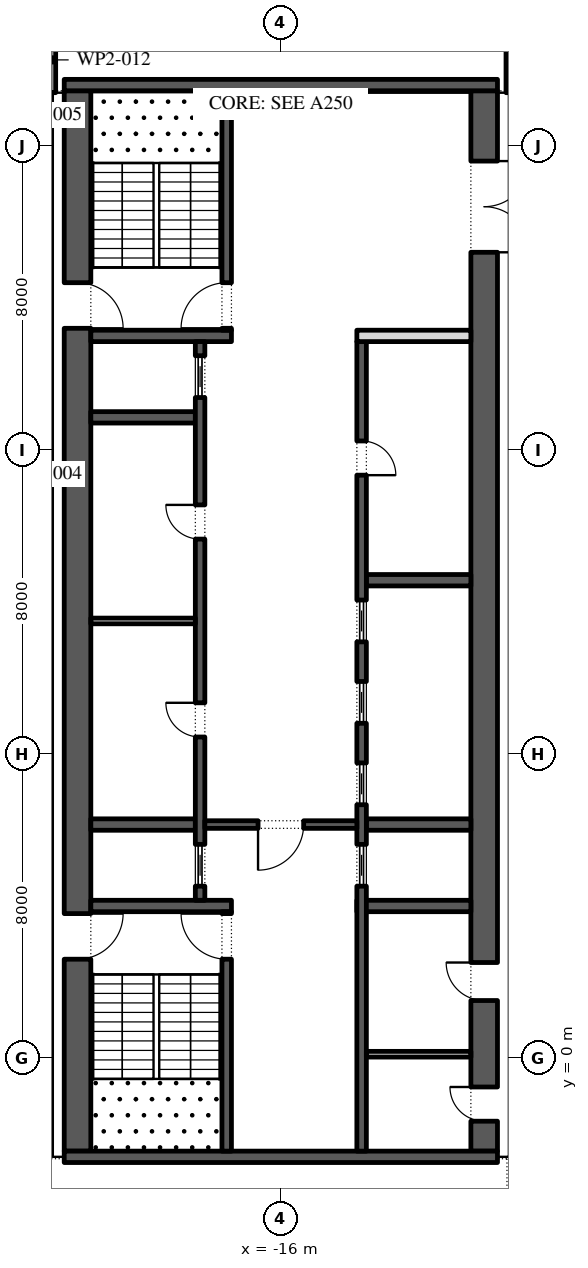
"""IFC4 building model, lengths in metres.
Left out: names, types, materials, properties, quantities, classifications, styles, units other than length and angle.
Written with IfcOpenShell. Run it as: python <this file> out.ifc"""

import sys

from ifc_helpers import new_model, si_unit, direction, frame, frame_2d, origin, place, context, subcontext, project, spatial, rectangle, extrude, element, fill, save


model = new_model("IFC4")
c1 = context("Model", 3, precision=1e-05, world=origin(), true_north=direction((0.0, 1.0)))
c2 = subcontext(c1, "Body", "Model", "MODEL_VIEW")
j1 = project(units=[si_unit("LENGTHUNIT", "METRE"), si_unit("PLANEANGLEUNIT", "RADIAN")], contexts=[c1])
p1 = place(None, origin())
s1 = spatial("IfcSite", under=j1, at=p1, CompositionType="ELEMENT")
p2 = place(p1, origin())
s2 = spatial("IfcBuilding", under=s1, at=p2, CompositionType="ELEMENT")
p3 = place(p2, frame((0.0, 0.0, 213.6)))
s3 = spatial("IfcBuildingStorey", under=s2, at=p3, CompositionType="ELEMENT", Elevation=213.6)
p4 = place(p3, frame((-33.157, 30.092, 0.0), z_axis=(0.0, 0.0, 1.0), x_axis=(0.224950279389, -0.974370243697, 0.0)))
e1 = element("IfcWall", 1, at=p4, inside=s3, PredefinedType="STANDARD", context=c2, shape_type="SweptSolid", body=[
    extrude(rectangle(XDim=49.5, YDim=0.3, at=frame_2d((24.75, 0.0))), origin(), (0.0, 0.0, 1.0), 4.0),
])
p5 = place(p4, frame((2.207, 0.0, 0.0)))
e2 = element("IfcOpeningElement", 2, at=p5, cuts=e1, PredefinedType="OPENING", context=c2, shape_type="SweptSolid", body=[
    extrude(rectangle(XDim=2.4, YDim=3.5, at=frame_2d((1.2, 1.75))), frame((0.0, 0.16, 0.0), z_axis=(0.0, -1.0, 0.0), x_axis=(1.0, 0.0, 0.0)), (0.0, 0.0, 1.0), 0.32),
])
p6 = place(p4, frame((8.121, 0.0, 0.45)))
e3 = element("IfcOpeningElement", 3, at=p6, cuts=e1, PredefinedType="OPENING", context=c2, shape_type="SweptSolid", body=[
    extrude(rectangle(XDim=4.5, YDim=2.825, at=frame_2d((2.25, 1.413))), frame((0.0, 0.16, 0.0), z_axis=(0.0, -1.0, 0.0), x_axis=(1.0, 0.0, 0.0)), (0.0, 0.0, 1.0), 0.32),
])
p7 = place(p4, frame((15.236, 0.0, 0.45)))
e4 = element("IfcOpeningElement", 4, at=p7, cuts=e1, PredefinedType="OPENING", context=c2, shape_type="SweptSolid", body=[
    extrude(rectangle(XDim=4.5, YDim=2.95, at=frame_2d((2.25, 1.475))), frame((0.0, 0.16, 0.0), z_axis=(0.0, -1.0, 0.0), x_axis=(1.0, 0.0, 0.0)), (0.0, 0.0, 1.0), 0.32),
])
p8 = place(p4, frame((22.35, 0.0, 0.45)))
e5 = element("IfcOpeningElement", 5, at=p8, cuts=e1, PredefinedType="OPENING", context=c2, shape_type="SweptSolid", body=[
    extrude(rectangle(XDim=4.5, YDim=3.0, at=frame_2d((2.25, 1.5))), frame((0.0, 0.16, 0.0), z_axis=(0.0, -1.0, 0.0), x_axis=(1.0, 0.0, 0.0)), (0.0, 0.0, 1.0), 0.32),
])
p9 = place(p4, frame((30.514, 0.0, 0.0)))
e6 = element("IfcOpeningElement", 6, at=p9, cuts=e1, PredefinedType="OPENING", context=c2, shape_type="SweptSolid", body=[
    extrude(rectangle(XDim=2.4, YDim=3.5, at=frame_2d((1.2, 1.75))), frame((0.0, 0.16, 0.0), z_axis=(0.0, -1.0, 0.0), x_axis=(1.0, 0.0, 0.0)), (0.0, 0.0, 1.0), 0.32),
])
p10 = place(p4, frame((36.579, 0.0, 0.45)))
e7 = element("IfcOpeningElement", 7, at=p10, cuts=e1, PredefinedType="OPENING", context=c2, shape_type="SweptSolid", body=[
    extrude(rectangle(XDim=4.5, YDim=3.05, at=frame_2d((2.25, 1.525))), frame((0.0, 0.16, 0.0), z_axis=(0.0, -1.0, 0.0), x_axis=(1.0, 0.0, 0.0)), (0.0, 0.0, 1.0), 0.32),
])
p11 = place(p4, frame((43.693, 0.0, 0.45)))
e8 = element("IfcOpeningElement", 8, at=p11, cuts=e1, PredefinedType="OPENING", context=c2, shape_type="SweptSolid", body=[
    extrude(rectangle(XDim=4.5, YDim=3.05, at=frame_2d((2.25, 1.525))), frame((0.0, 0.16, 0.0), z_axis=(0.0, -1.0, 0.0), x_axis=(1.0, 0.0, 0.0)), (0.0, 0.0, 1.0), 0.32),
])
p12 = place(p3, frame((-21.35, -2.45, 0.0), z_axis=(0.0, 0.0, 1.0), x_axis=(0.0, 1.0, 0.0)))
e9 = element("IfcWall", 9, at=p12, inside=s3, PredefinedType="SHEAR", context=c2, shape_type="SweptSolid", body=[
    extrude(rectangle(XDim=27.9, YDim=0.7, at=frame_2d((13.95, 0.0))), origin(), (0.0, 0.0, 1.0), 4.0),
])
p13 = place(p12, frame((5.05, 0.0, 0.0)))
e10 = element("IfcOpeningElement", 10, at=p13, cuts=e9, PredefinedType="OPENING", context=c2, shape_type="SweptSolid", body=[
    extrude(rectangle(XDim=1.2, YDim=2.1, at=frame_2d((0.6, 1.05))), frame((0.0, 0.36, 0.0), z_axis=(0.0, -1.0, 0.0), x_axis=(1.0, 0.0, 0.0)), (0.0, 0.0, 1.0), 0.72),
])
p14 = place(p12, frame((21.65, 0.0, 0.0)))
e11 = element("IfcOpeningElement", 11, at=p14, cuts=e9, PredefinedType="OPENING", context=c2, shape_type="SweptSolid", body=[
    extrude(rectangle(XDim=1.2, YDim=2.1, at=frame_2d((0.6, 1.05))), frame((0.0, 0.36, 0.0), z_axis=(0.0, -1.0, 0.0), x_axis=(1.0, 0.0, 0.0)), (0.0, 0.0, 1.0), 0.72),
])
p15 = place(p3, frame((-10.65, -2.45, 0.0), z_axis=(0.0, 0.0, 1.0), x_axis=(0.0, 1.0, 0.0)))
e12 = element("IfcWall", 12, at=p15, inside=s3, PredefinedType="SHEAR", context=c2, shape_type="SweptSolid", body=[
    extrude(rectangle(XDim=27.9, YDim=0.7, at=frame_2d((13.95, 0.0))), origin(), (0.0, 0.0, 1.0), 4.0),
])
p16 = place(p15, frame((23.65, 0.0, 0.0)))
e13 = element("IfcOpeningElement", 13, at=p16, cuts=e12, PredefinedType="OPENING", context=c2, shape_type="SweptSolid", body=[
    extrude(rectangle(XDim=2.4, YDim=2.1, at=frame_2d((1.2, 1.05))), frame((0.0, 0.36, 0.0), z_axis=(0.0, -1.0, 0.0), x_axis=(1.0, 0.0, 0.0)), (0.0, 0.0, 1.0), 0.72),
])
p17 = place(p15, frame((0.788, 0.0, 0.0)))
e14 = element("IfcOpeningElement", 14, at=p17, cuts=e12, PredefinedType="OPENING", context=c2, shape_type="SweptSolid", body=[
    extrude(rectangle(XDim=0.9, YDim=2.1, at=frame_2d((0.45, 1.05))), frame((0.0, 0.36, 0.0), z_axis=(0.0, -1.0, 0.0), x_axis=(1.0, 0.0, 0.0)), (0.0, 0.0, 1.0), 0.72),
])
p18 = place(p15, frame((3.962, 0.0, 0.0)))
e15 = element("IfcOpeningElement", 15, at=p18, cuts=e12, PredefinedType="OPENING", context=c2, shape_type="SweptSolid", body=[
    extrude(rectangle(XDim=1.0, YDim=2.1, at=frame_2d((0.5, 1.05))), frame((0.0, 0.36, 0.0), z_axis=(0.0, -1.0, 0.0), x_axis=(1.0, 0.0, 0.0)), (0.0, 0.0, 1.0), 0.72),
])
for number, where, z_axis, x_axis in (
    (16, (-21.7, -2.6, 0.0), (0.0, 0.0, 1.0), (1.0, 0.0, 0.0)),
    (17, (-21.7, 25.6, 0.0), (0.0, 0.0, 1.0), (1.0, 0.0, 0.0)),
):
    element("IfcWall", number, at=place(p3, frame(where, z_axis=z_axis, x_axis=x_axis)), inside=s3, PredefinedType="SHEAR", context=c2, shape_type="SweptSolid", body=[
        extrude(rectangle(XDim=11.4, YDim=0.3, at=frame_2d((5.7, 0.0))), origin(), (0.0, 0.0, 1.0), 4.0),
    ])
p19 = place(p3, frame((-21.0, 4.0, 0.0), z_axis=(0.0, 0.0, 1.0), x_axis=(1.0, 0.0, 0.0)))
e18 = element("IfcWall", 18, at=p19, inside=s3, PredefinedType="SHEAR", context=c2, shape_type="SweptSolid", body=[
    extrude(rectangle(XDim=3.7, YDim=0.3, at=frame_2d((1.85, 0.0))), origin(), (0.0, 0.0, 1.0), 4.0),
])
p20 = place(p3, frame((-17.425, -2.45, 0.0), z_axis=(0.0, 0.0, 1.0), x_axis=(0.0, 1.0, 0.0)))
e19 = element("IfcWall", 19, at=p20, inside=s3, PredefinedType="SHEAR", context=c2, shape_type="SweptSolid", body=[
    extrude(rectangle(XDim=6.3, YDim=0.25, at=frame_2d((3.15, 0.0))), origin(), (0.0, 0.0, 1.0), 4.0),
])
p21 = place(p20, frame((5.05, 0.0, 0.0)))
e20 = element("IfcOpeningElement", 20, at=p21, cuts=e19, PredefinedType="OPENING", context=c2, shape_type="SweptSolid", body=[
    extrude(rectangle(XDim=1.2, YDim=2.1, at=frame_2d((0.6, 1.05))), frame((0.0, 0.135, 0.0), z_axis=(0.0, -1.0, 0.0), x_axis=(1.0, 0.0, 0.0)), (0.0, 0.0, 1.0), 0.27),
])
p22 = place(p3, frame((-21.0, 19.0, 0.0), z_axis=(0.0, 0.0, 1.0), x_axis=(1.0, 0.0, 0.0)))
e21 = element("IfcWall", 21, at=p22, inside=s3, PredefinedType="SHEAR", context=c2, shape_type="SweptSolid", body=[
    extrude(rectangle(XDim=3.7, YDim=0.3, at=frame_2d((1.85, 0.0))), origin(), (0.0, 0.0, 1.0), 4.0),
])
p23 = place(p3, frame((-17.425, 19.15, 0.0), z_axis=(0.0, 0.0, 1.0), x_axis=(0.0, 1.0, 0.0)))
e22 = element("IfcWall", 22, at=p23, inside=s3, PredefinedType="SHEAR", context=c2, shape_type="SweptSolid", body=[
    extrude(rectangle(XDim=6.3, YDim=0.25, at=frame_2d((3.15, 0.0))), origin(), (0.0, 0.0, 1.0), 4.0),
])
p24 = place(p23, frame((0.05, 0.0, 0.0)))
e23 = element("IfcOpeningElement", 23, at=p24, cuts=e22, PredefinedType="OPENING", context=c2, shape_type="SweptSolid", body=[
    extrude(rectangle(XDim=1.2, YDim=2.1, at=frame_2d((0.6, 1.05))), frame((0.0, 0.135, 0.0), z_axis=(0.0, -1.0, 0.0), x_axis=(1.0, 0.0, 0.0)), (0.0, 0.0, 1.0), 0.27),
])
for number, where, z_axis, x_axis in (
    (24, (-21.0, 6.143, 0.0), (0.0, 0.0, 1.0), (1.0, 0.0, 0.0)),
    (25, (-21.0, 16.857, 0.0), (0.0, 0.0, 1.0), (1.0, 0.0, 0.0)),
):
    element("IfcWall", number, at=place(p3, frame(where, z_axis=z_axis, x_axis=x_axis)), inside=s3, PredefinedType="SHEAR", context=c2, shape_type="SweptSolid", body=[
        extrude(rectangle(XDim=2.75, YDim=0.3, at=frame_2d((1.375, 0.0))), origin(), (0.0, 0.0, 1.0), 4.0),
    ])
p25 = place(p3, frame((-18.125, 4.15, 0.0), z_axis=(0.0, 0.0, 1.0), x_axis=(0.0, 1.0, 0.0)))
e26 = element("IfcWall", 26, at=p25, inside=s3, PredefinedType="SHEAR", context=c2, shape_type="SweptSolid", body=[
    extrude(rectangle(XDim=14.7, YDim=0.25, at=frame_2d((7.35, 0.0))), origin(), (0.0, 0.0, 1.0), 4.0),
])
p26 = place(p25, frame((4.296, 0.0, 0.0)))
e27 = element("IfcOpeningElement", 27, at=p26, cuts=e26, PredefinedType="OPENING", context=c2, shape_type="SweptSolid", body=[
    extrude(rectangle(XDim=0.9, YDim=2.1, at=frame_2d((0.45, 1.05))), frame((0.0, 0.135, 0.0), z_axis=(0.0, -1.0, 0.0), x_axis=(1.0, 0.0, 0.0)), (0.0, 0.0, 1.0), 0.27),
])
p27 = place(p25, frame((9.504, 0.0, 0.0)))
e28 = element("IfcOpeningElement", 28, at=p27, cuts=e26, PredefinedType="OPENING", context=c2, shape_type="SweptSolid", body=[
    extrude(rectangle(XDim=0.9, YDim=2.1, at=frame_2d((0.45, 1.05))), frame((0.0, 0.135, 0.0), z_axis=(0.0, -1.0, 0.0), x_axis=(1.0, 0.0, 0.0)), (0.0, 0.0, 1.0), 0.27),
])
p28 = place(p25, frame((0.371, 0.0, 0.0)))
e29 = element("IfcOpeningElement", 29, at=p28, cuts=e26, PredefinedType="OPENING", context=c2, shape_type="SweptSolid", body=[
    extrude(rectangle(XDim=1.1, YDim=2.1, at=frame_2d((0.55, 1.05))), frame((0.0, 0.135, 0.0), z_axis=(0.0, -1.0, 0.0), x_axis=(1.0, 0.0, 0.0)), (0.0, 0.0, 1.0), 0.27),
])
p29 = place(p25, frame((13.229, 0.0, 0.0)))
e30 = element("IfcOpeningElement", 30, at=p29, cuts=e26, PredefinedType="OPENING", context=c2, shape_type="SweptSolid", body=[
    extrude(rectangle(XDim=1.1, YDim=2.1, at=frame_2d((0.55, 1.05))), frame((0.0, 0.135, 0.0), z_axis=(0.0, -1.0, 0.0), x_axis=(1.0, 0.0, 0.0)), (0.0, 0.0, 1.0), 0.27),
])
p30 = place(p3, frame((-21.0, 11.5, 0.0), z_axis=(0.0, 0.0, 1.0), x_axis=(1.0, 0.0, 0.0)))
e31 = element("IfcWall", 31, at=p30, inside=s3, PredefinedType="PARTITIONING", context=c2, shape_type="SweptSolid", body=[
    extrude(rectangle(XDim=2.75, YDim=0.15, at=frame_2d((1.375, 0.0))), origin(), (0.0, 0.0, 1.0), 4.0),
])
p31 = place(p3, frame((-14.0, 4.0, 0.0), z_axis=(0.0, 0.0, 1.0), x_axis=(1.0, 0.0, 0.0)))
e32 = element("IfcWall", 32, at=p31, inside=s3, PredefinedType="SHEAR", context=c2, shape_type="SweptSolid", body=[
    extrude(rectangle(XDim=3.0, YDim=0.3, at=frame_2d((1.5, 0.0))), origin(), (0.0, 0.0, 1.0), 4.0),
])
for number, where, z_axis, x_axis in (
    (33, (-13.75, 6.143, 0.0), (0.0, 0.0, 1.0), (1.0, 0.0, 0.0)),
    (34, (-13.75, 12.571, 0.0), (0.0, 0.0, 1.0), (1.0, 0.0, 0.0)),
):
    element("IfcWall", number, at=place(p3, frame(where, z_axis=z_axis, x_axis=x_axis)), inside=s3, PredefinedType="SHEAR", context=c2, shape_type="SweptSolid", body=[
        extrude(rectangle(XDim=2.75, YDim=0.3, at=frame_2d((1.375, 0.0))), origin(), (0.0, 0.0, 1.0), 4.0),
    ])
p32 = place(p3, frame((-13.875, -2.45, 0.0), z_axis=(0.0, 0.0, 1.0), x_axis=(0.0, 1.0, 0.0)))
e35 = element("IfcWall", 35, at=p32, inside=s3, PredefinedType="SHEAR", context=c2, shape_type="SweptSolid", body=[
    extrude(rectangle(XDim=21.3, YDim=0.25, at=frame_2d((10.65, 0.0))), origin(), (0.0, 0.0, 1.0), 4.0),
])
p33 = place(p32, frame((17.786, 0.0, 0.0)))
e36 = element("IfcOpeningElement", 36, at=p33, cuts=e35, PredefinedType="OPENING", context=c2, shape_type="SweptSolid", body=[
    extrude(rectangle(XDim=0.9, YDim=2.1, at=frame_2d((0.45, 1.05))), frame((0.0, 0.135, 0.0), z_axis=(0.0, -1.0, 0.0), x_axis=(1.0, 0.0, 0.0)), (0.0, 0.0, 1.0), 0.27),
])
p34 = place(p32, frame((6.971, 0.0, 0.0)))
e37 = element("IfcOpeningElement", 37, at=p34, cuts=e35, PredefinedType="OPENING", context=c2, shape_type="SweptSolid", body=[
    extrude(rectangle(XDim=1.1, YDim=2.1, at=frame_2d((0.55, 1.05))), frame((0.0, 0.135, 0.0), z_axis=(0.0, -1.0, 0.0), x_axis=(1.0, 0.0, 0.0)), (0.0, 0.0, 1.0), 0.27),
])
p35 = place(p32, frame((9.114, 0.0, 0.0)))
e38 = element("IfcOpeningElement", 38, at=p35, cuts=e35, PredefinedType="OPENING", context=c2, shape_type="SweptSolid", body=[
    extrude(rectangle(XDim=1.1, YDim=2.1, at=frame_2d((0.55, 1.05))), frame((0.0, 0.135, 0.0), z_axis=(0.0, -1.0, 0.0), x_axis=(1.0, 0.0, 0.0)), (0.0, 0.0, 1.0), 0.27),
])
p36 = place(p32, frame((11.257, 0.0, 0.0)))
e39 = element("IfcOpeningElement", 39, at=p36, cuts=e35, PredefinedType="OPENING", context=c2, shape_type="SweptSolid", body=[
    extrude(rectangle(XDim=1.1, YDim=2.1, at=frame_2d((0.55, 1.05))), frame((0.0, 0.135, 0.0), z_axis=(0.0, -1.0, 0.0), x_axis=(1.0, 0.0, 0.0)), (0.0, 0.0, 1.0), 0.27),
])
p37 = place(p32, frame((13.4, 0.0, 0.0)))
e40 = element("IfcOpeningElement", 40, at=p37, cuts=e35, PredefinedType="OPENING", context=c2, shape_type="SweptSolid", body=[
    extrude(rectangle(XDim=1.1, YDim=2.1, at=frame_2d((0.55, 1.05))), frame((0.0, 0.135, 0.0), z_axis=(0.0, -1.0, 0.0), x_axis=(1.0, 0.0, 0.0)), (0.0, 0.0, 1.0), 0.27),
])
p38 = place(p3, frame((-14.0, 19.0, 0.0), z_axis=(0.0, 0.0, 1.0), x_axis=(1.0, 0.0, 0.0)))
e41 = element("IfcWall", 41, at=p38, inside=s3, PredefinedType="PARTITIONING", context=c2, shape_type="SweptSolid", body=[
    extrude(rectangle(XDim=3.0, YDim=0.3, at=frame_2d((1.5, 0.0))), origin(), (0.0, 0.0, 1.0), 4.0),
])
p39 = place(p3, frame((-18.0, 6.143, 0.0), z_axis=(0.0, 0.0, 1.0), x_axis=(1.0, 0.0, 0.0)))
e42 = element("IfcWall", 42, at=p39, inside=s3, PredefinedType="SHEAR", context=c2, shape_type="SweptSolid", body=[
    extrude(rectangle(XDim=4.0, YDim=0.2, at=frame_2d((2.0, 0.0))), origin(), (0.0, 0.0, 1.0), 4.0),
])
p40 = place(p39, frame((1.4, 0.0, 0.0)))
e43 = element("IfcOpeningElement", 43, at=p40, cuts=e42, PredefinedType="OPENING", context=c2, shape_type="SweptSolid", body=[
    extrude(rectangle(XDim=1.2, YDim=2.1, at=frame_2d((0.6, 1.05))), frame((0.0, 0.11, 0.0), z_axis=(0.0, -1.0, 0.0), x_axis=(1.0, 0.0, 0.0)), (0.0, 0.0, 1.0), 0.22),
])
p41 = place(p3, frame((-13.75, 0.1, 0.0), z_axis=(0.0, 0.0, 1.0), x_axis=(1.0, 0.0, 0.0)))
e44 = element("IfcWall", 44, at=p41, inside=s3, PredefinedType="PARTITIONING", context=c2, shape_type="SweptSolid", body=[
    extrude(rectangle(XDim=2.75, YDim=0.15, at=frame_2d((1.375, 0.0))), origin(), (0.0, 0.0, 1.0), 4.0),
])
p42 = place(p3, frame((-22.0, 27.125, 0.0), z_axis=(0.0, 0.0, 1.0), x_axis=(0.0, -1.0, 0.0)))
e45 = element("IfcWall", 45, at=p42, inside=s3, PredefinedType="PARTITIONING", context=c2, shape_type="SweptSolid", body=[
    extrude(rectangle(XDim=1.725, YDim=0.15, at=frame_2d((0.863, 0.0))), origin(), (0.0, 0.0, 1.0), 4.0),
])
p43 = place(p3, frame((-10.0, 25.4, 0.0), z_axis=(0.0, 0.0, 1.0), x_axis=(0.0, 1.0, 0.0)))
e46 = element("IfcWall", 46, at=p43, inside=s3, PredefinedType="PARTITIONING", context=c2, shape_type="SweptSolid", body=[
    extrude(rectangle(XDim=1.8, YDim=0.15, at=frame_2d((0.9, 0.0))), origin(), (0.0, 0.0, 1.0), 4.0),
])
p44 = place(p26, origin())
e47 = element("IfcDoor", 47, at=p44, inside=s3, OperationType="SINGLE_SWING_LEFT", PredefinedType="DOOR", context=c2, shape_type="SweptSolid", body=[
    extrude(rectangle(XDim=0.9, YDim=2.1, at=frame_2d((0.45, 1.05))), frame((0.0, 0.125, 0.0), z_axis=(0.0, -1.0, 0.0), x_axis=(1.0, 0.0, 0.0)), (0.0, 0.0, 1.0), 0.05),
])
fill(e27, e47)
p45 = place(p27, origin())
e48 = element("IfcDoor", 48, at=p45, inside=s3, OperationType="SINGLE_SWING_LEFT", PredefinedType="DOOR", context=c2, shape_type="SweptSolid", body=[
    extrude(rectangle(XDim=0.9, YDim=2.1, at=frame_2d((0.45, 1.05))), frame((0.0, 0.125, 0.0), z_axis=(0.0, -1.0, 0.0), x_axis=(1.0, 0.0, 0.0)), (0.0, 0.0, 1.0), 0.05),
])
fill(e28, e48)
p46 = place(p28, origin())
e49 = element("IfcDoor", 49, at=p46, inside=s3, OperationType="SLIDING_TO_LEFT", PredefinedType="DOOR", context=c2, shape_type="SweptSolid", body=[
    extrude(rectangle(XDim=1.1, YDim=2.1, at=frame_2d((0.55, 1.05))), frame((0.0, 0.025, 0.0), z_axis=(0.0, -1.0, 0.0), x_axis=(1.0, 0.0, 0.0)), (0.0, 0.0, 1.0), 0.05),
])
fill(e29, e49)
p47 = place(p29, origin())
e50 = element("IfcDoor", 50, at=p47, inside=s3, OperationType="SLIDING_TO_LEFT", PredefinedType="DOOR", context=c2, shape_type="SweptSolid", body=[
    extrude(rectangle(XDim=1.1, YDim=2.1, at=frame_2d((0.55, 1.05))), frame((0.0, 0.025, 0.0), z_axis=(0.0, -1.0, 0.0), x_axis=(1.0, 0.0, 0.0)), (0.0, 0.0, 1.0), 0.05),
])
fill(e30, e50)
p48 = place(p33, frame((0.9, -0.2, 0.0), z_axis=(0.0, 0.0, 1.0), x_axis=(-1.0, 0.0, 0.0)))
e51 = element("IfcDoor", 51, at=p48, inside=s3, OperationType="SINGLE_SWING_LEFT", PredefinedType="DOOR", context=c2, shape_type="SweptSolid", body=[
    extrude(rectangle(XDim=0.9, YDim=2.1, at=frame_2d((0.45, 1.05))), frame((0.0, -0.075, 0.0), z_axis=(0.0, -1.0, 0.0), x_axis=(1.0, 0.0, 0.0)), (0.0, 0.0, 1.0), 0.05),
])
fill(e36, e51)
p49 = place(p34, origin())
e52 = element("IfcDoor", 52, at=p49, inside=s3, OperationType="SLIDING_TO_LEFT", PredefinedType="DOOR", context=c2, shape_type="SweptSolid", body=[
    extrude(rectangle(XDim=1.1, YDim=2.1, at=frame_2d((0.55, 1.05))), frame((0.0, 0.025, 0.0), z_axis=(0.0, -1.0, 0.0), x_axis=(1.0, 0.0, 0.0)), (0.0, 0.0, 1.0), 0.05),
])
fill(e37, e52)
p50 = place(p35, origin())
e53 = element("IfcDoor", 53, at=p50, inside=s3, OperationType="SLIDING_TO_LEFT", PredefinedType="DOOR", context=c2, shape_type="SweptSolid", body=[
    extrude(rectangle(XDim=1.1, YDim=2.1, at=frame_2d((0.55, 1.05))), frame((0.0, 0.025, 0.0), z_axis=(0.0, -1.0, 0.0), x_axis=(1.0, 0.0, 0.0)), (0.0, 0.0, 1.0), 0.05),
])
fill(e38, e53)
p51 = place(p36, origin())
e54 = element("IfcDoor", 54, at=p51, inside=s3, OperationType="SLIDING_TO_LEFT", PredefinedType="DOOR", context=c2, shape_type="SweptSolid", body=[
    extrude(rectangle(XDim=1.1, YDim=2.1, at=frame_2d((0.55, 1.05))), frame((0.0, 0.025, 0.0), z_axis=(0.0, -1.0, 0.0), x_axis=(1.0, 0.0, 0.0)), (0.0, 0.0, 1.0), 0.05),
])
fill(e39, e54)
p52 = place(p37, origin())
e55 = element("IfcDoor", 55, at=p52, inside=s3, OperationType="SLIDING_TO_LEFT", PredefinedType="DOOR", context=c2, shape_type="SweptSolid", body=[
    extrude(rectangle(XDim=1.1, YDim=2.1, at=frame_2d((0.55, 1.05))), frame((0.0, 0.025, 0.0), z_axis=(0.0, -1.0, 0.0), x_axis=(1.0, 0.0, 0.0)), (0.0, 0.0, 1.0), 0.05),
])
fill(e40, e55)
p53 = place(p40, frame((1.2, 0.0, 0.0), z_axis=(0.0, 0.0, 1.0), x_axis=(-1.0, 0.0, 0.0)))
e56 = element("IfcDoor", 56, at=p53, inside=s3, OperationType="SINGLE_SWING_LEFT", PredefinedType="DOOR", context=c2, shape_type="SweptSolid", body=[
    extrude(rectangle(XDim=1.2, YDim=2.1, at=frame_2d((0.6, 1.05))), frame((0.0, 0.025, 0.0), z_axis=(0.0, -1.0, 0.0), x_axis=(1.0, 0.0, 0.0)), (0.0, 0.0, 1.0), 0.05),
])
fill(e43, e56)
p54 = place(p16, frame((2.4, 0.0, 0.0), z_axis=(0.0, 0.0, 1.0), x_axis=(-1.0, 0.0, 0.0)))
e57 = element("IfcDoor", 57, at=p54, inside=s3, OperationType="DOUBLE_DOOR_SINGLE_SWING", PredefinedType="DOOR", context=c2, shape_type="SweptSolid", body=[
    extrude(rectangle(XDim=2.4, YDim=2.1, at=frame_2d((1.2, 1.05))), frame((0.0, 0.025, 0.0), z_axis=(0.0, -1.0, 0.0), x_axis=(1.0, 0.0, 0.0)), (0.0, 0.0, 1.0), 0.05),
])
fill(e13, e57)
p55 = place(p21, origin())
e58 = element("IfcDoor", 58, at=p55, inside=s3, OperationType="SINGLE_SWING_LEFT", PredefinedType="DOOR", context=c2, shape_type="SweptSolid", body=[
    extrude(rectangle(XDim=1.2, YDim=2.1, at=frame_2d((0.6, 1.05))), frame((0.0, 0.025, 0.0), z_axis=(0.0, -1.0, 0.0), x_axis=(1.0, 0.0, 0.0)), (0.0, 0.0, 1.0), 0.05),
])
fill(e20, e58)
p56 = place(p13, frame((1.2, 0.0, 0.0), z_axis=(0.0, 0.0, 1.0), x_axis=(-1.0, 0.0, 0.0)))
e59 = element("IfcDoor", 59, at=p56, inside=s3, OperationType="SINGLE_SWING_RIGHT", PredefinedType="DOOR", context=c2, shape_type="SweptSolid", body=[
    extrude(rectangle(XDim=1.2, YDim=2.1, at=frame_2d((0.6, 1.05))), frame((0.0, 0.025, 0.0), z_axis=(0.0, -1.0, 0.0), x_axis=(1.0, 0.0, 0.0)), (0.0, 0.0, 1.0), 0.05),
])
fill(e10, e59)
p57 = place(p24, origin())
e60 = element("IfcDoor", 60, at=p57, inside=s3, OperationType="SINGLE_SWING_RIGHT", PredefinedType="DOOR", context=c2, shape_type="SweptSolid", body=[
    extrude(rectangle(XDim=1.2, YDim=2.1, at=frame_2d((0.6, 1.05))), frame((0.0, 0.025, 0.0), z_axis=(0.0, -1.0, 0.0), x_axis=(1.0, 0.0, 0.0)), (0.0, 0.0, 1.0), 0.05),
])
fill(e23, e60)
p58 = place(p14, frame((1.2, 0.0, 0.0), z_axis=(0.0, 0.0, 1.0), x_axis=(-1.0, 0.0, 0.0)))
e61 = element("IfcDoor", 61, at=p58, inside=s3, OperationType="SINGLE_SWING_LEFT", PredefinedType="DOOR", context=c2, shape_type="SweptSolid", body=[
    extrude(rectangle(XDim=1.2, YDim=2.1, at=frame_2d((0.6, 1.05))), frame((0.0, 0.025, 0.0), z_axis=(0.0, -1.0, 0.0), x_axis=(1.0, 0.0, 0.0)), (0.0, 0.0, 1.0), 0.05),
])
fill(e11, e61)
p59 = place(p17, origin())
e62 = element("IfcDoor", 62, at=p59, inside=s3, OperationType="SINGLE_SWING_LEFT", PredefinedType="DOOR", context=c2, shape_type="SweptSolid", body=[
    extrude(rectangle(XDim=0.9, YDim=2.1, at=frame_2d((0.45, 1.05))), frame((0.0, 0.35, 0.0), z_axis=(0.0, -1.0, 0.0), x_axis=(1.0, 0.0, 0.0)), (0.0, 0.0, 1.0), 0.05),
])
fill(e14, e62)
p60 = place(p18, origin())
e63 = element("IfcDoor", 63, at=p60, inside=s3, OperationType="SINGLE_SWING_LEFT", PredefinedType="DOOR", context=c2, shape_type="SweptSolid", body=[
    extrude(rectangle(XDim=1.0, YDim=2.1, at=frame_2d((0.5, 1.05))), frame((0.0, 0.35, 0.0), z_axis=(0.0, -1.0, 0.0), x_axis=(1.0, 0.0, 0.0)), (0.0, 0.0, 1.0), 0.05),
])
fill(e15, e63)
save(model, sys.argv[1])
